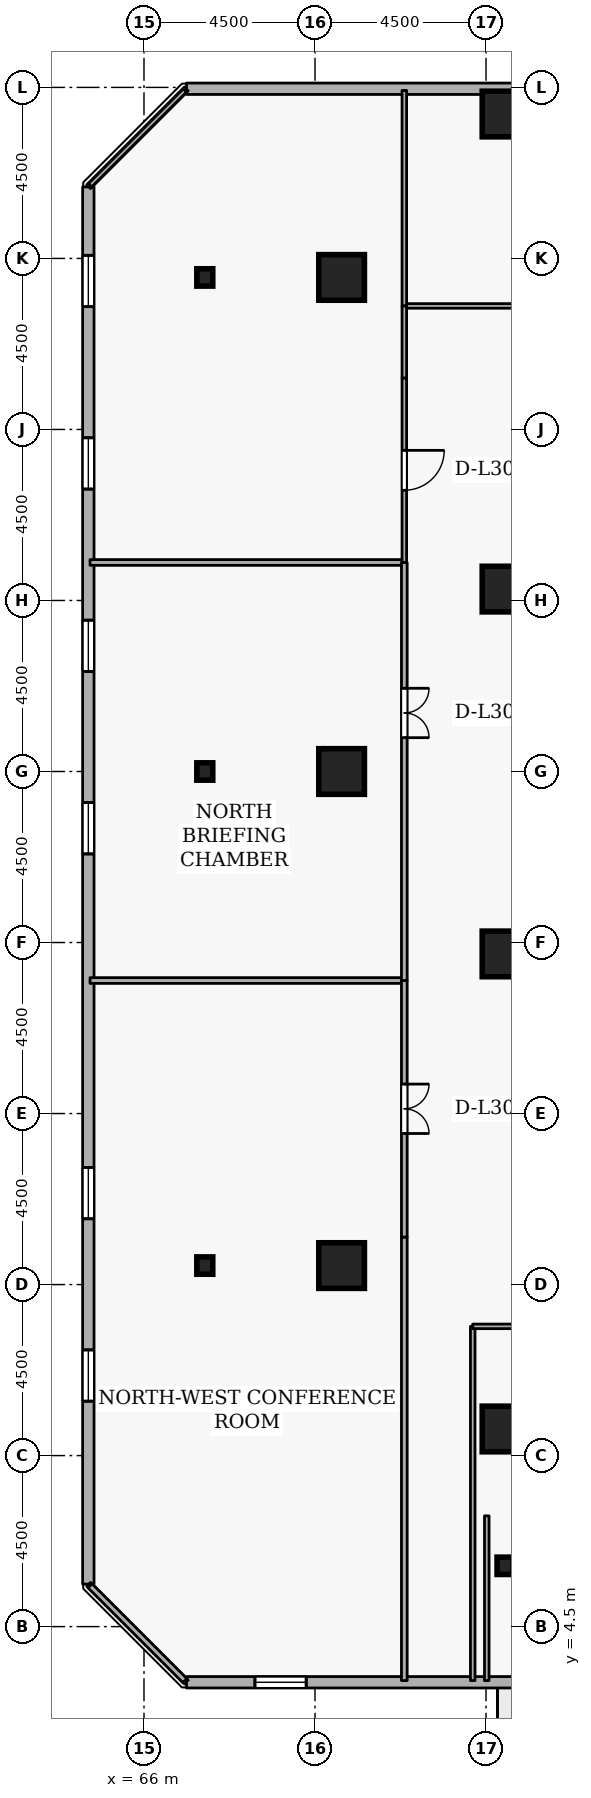
"""IFC4 building model, lengths in metres.
Left out: names, types, materials, properties, quantities, classifications, styles, units other than length and angle.
Written with IfcOpenShell. Run it as: python <this file> out.ifc"""

import sys

from ifc_helpers import new_model, si_unit, direction, frame, frame_2d, origin, origin_2d, place, context, subcontext, project, spatial, rectangle, i_section, extrude, element, fill, save


model = new_model("IFC4")
c1 = context("Model", 3, precision=1e-05, world=origin(), true_north=direction((0.0, 1.0)))
c2 = subcontext(c1, "Body", "Model", "MODEL_VIEW")
j1 = project(units=[si_unit("LENGTHUNIT", "METRE"), si_unit("PLANEANGLEUNIT", "RADIAN")], contexts=[c1])
p1 = place(None, origin())
s1 = spatial("IfcSite", under=j1, at=p1, CompositionType="ELEMENT")
p2 = place(p1, origin())
s2 = spatial("IfcBuilding", under=s1, at=p2, CompositionType="ELEMENT")
p3 = place(p2, frame((0.0, 0.0, 116.1)))
s3 = spatial("IfcBuildingStorey", under=s2, at=p3, CompositionType="ELEMENT", Elevation=116.1)
for number, where, z_axis, x_axis in (
    (1, (75.5, 44.3, 0.0), (0.0, 0.0, 1.0), (1.0, 0.0, 0.0)),
    (2, (71.2, 14.0, 0.0), (0.0, 0.0, 1.0), (1.0, 0.0, 0.0)),
    (3, (71.2, 27.0, 0.0), (0.0, 0.0, 1.0), (1.0, 0.0, 0.0)),
    (4, (71.2, 40.0, 0.0), (0.0, 0.0, 1.0), (1.0, 0.0, 0.0)),
    (5, (75.5, 9.7, 0.0), (0.0, 0.0, 1.0), (1.0, 0.0, 0.0)),
    (6, (75.5, 22.2, 0.0), (0.0, 0.0, 1.0), (1.0, 0.0, 0.0)),
    (7, (75.5, 31.8, 0.0), (0.0, 0.0, 1.0), (1.0, 0.0, 0.0)),
):
    element("IfcColumn", number, at=place(p3, frame(where, z_axis=z_axis, x_axis=x_axis)), inside=s3, PredefinedType="COLUMN", context=c2, shape_type="SweptSolid", body=[
        extrude(rectangle(XDim=1.2, YDim=1.2, at=origin_2d()), origin(), (0.0, 0.0, 1.0), 3.6),
    ])
for number, where, z_axis, x_axis in (
    (8, (67.6, 14.0, 0.0), (0.0, 0.0, 1.0), (1.0, 0.0, 0.0)),
    (9, (67.6, 27.0, 0.0), (0.0, 0.0, 1.0), (1.0, 0.0, 0.0)),
    (10, (67.6, 40.0, 0.0), (0.0, 0.0, 1.0), (1.0, 0.0, 0.0)),
    (11, (75.5, 6.1, 0.0), (0.0, 0.0, 1.0), (1.0, 0.0, 0.0)),
):
    element("IfcColumn", number, at=place(p3, frame(where, z_axis=z_axis, x_axis=x_axis)), inside=s3, PredefinedType="COLUMN", context=c2, shape_type="SweptSolid", body=[
        extrude(i_section(OverallWidth=0.418, OverallDepth=0.456, WebThickness=0.042, FlangeThickness=0.067, FilletRadius=0.015, at=origin_2d()), origin(), (0.0, 0.0, 1.0), 3.6),
    ])
p4 = place(p3, frame((67.119, 3.035, 0.0), z_axis=(0.0, 0.0, 1.0), x_axis=(1.0, 0.0, 0.0)))
e12 = element("IfcWall", 12, at=p4, inside=s3, PredefinedType="STANDARD", context=c2, shape_type="SweptSolid", body=[
    extrude(rectangle(XDim=36.763, YDim=0.3, at=frame_2d((18.381, 0.0))), origin(), (0.0, 0.0, 1.0), 2.22),
])
p5 = place(p4, frame((19.281, 0.0, 0.0)))
e13 = element("IfcOpeningElement", 13, at=p5, cuts=e12, PredefinedType="OPENING", context=c2, shape_type="SweptSolid", body=[
    extrude(rectangle(XDim=1.0, YDim=2.08, at=frame_2d((0.5, 1.04))), frame((0.0, 0.16, 0.0), z_axis=(0.0, -1.0, 0.0), x_axis=(1.0, 0.0, 0.0)), (0.0, 0.0, 1.0), 0.32),
])
p6 = place(p4, frame((1.8, 0.0, 0.72)))
e14 = element("IfcOpeningElement", 14, at=p6, cuts=e12, PredefinedType="OPENING", context=c2, shape_type="SweptSolid", body=[
    extrude(rectangle(XDim=1.35, YDim=1.05, at=frame_2d((0.675, 0.525))), frame((0.0, 0.16, 0.0), z_axis=(0.0, -1.0, 0.0), x_axis=(1.0, 0.0, 0.0)), (0.0, 0.0, 1.0), 0.32),
])
p7 = place(p4, frame((11.4, 0.0, 0.72)))
e15 = element("IfcOpeningElement", 15, at=p7, cuts=e12, PredefinedType="OPENING", context=c2, shape_type="SweptSolid", body=[
    extrude(rectangle(XDim=1.35, YDim=1.05, at=frame_2d((0.675, 0.525))), frame((0.0, 0.16, 0.0), z_axis=(0.0, -1.0, 0.0), x_axis=(1.0, 0.0, 0.0)), (0.0, 0.0, 1.0), 0.32),
])
p8 = place(p4, frame((16.2, 0.0, 0.72)))
e16 = element("IfcOpeningElement", 16, at=p8, cuts=e12, PredefinedType="OPENING", context=c2, shape_type="SweptSolid", body=[
    extrude(rectangle(XDim=1.35, YDim=1.05, at=frame_2d((0.675, 0.525))), frame((0.0, 0.16, 0.0), z_axis=(0.0, -1.0, 0.0), x_axis=(1.0, 0.0, 0.0)), (0.0, 0.0, 1.0), 0.32),
])
p9 = place(p4, frame((25.8, 0.0, 0.72)))
e17 = element("IfcOpeningElement", 17, at=p9, cuts=e12, PredefinedType="OPENING", context=c2, shape_type="SweptSolid", body=[
    extrude(rectangle(XDim=1.35, YDim=1.05, at=frame_2d((0.675, 0.525))), frame((0.0, 0.16, 0.0), z_axis=(0.0, -1.0, 0.0), x_axis=(1.0, 0.0, 0.0)), (0.0, 0.0, 1.0), 0.32),
])
p10 = place(p4, frame((30.6, 0.0, 0.72)))
e18 = element("IfcOpeningElement", 18, at=p10, cuts=e12, PredefinedType="OPENING", context=c2, shape_type="SweptSolid", body=[
    extrude(rectangle(XDim=1.35, YDim=1.05, at=frame_2d((0.675, 0.525))), frame((0.0, 0.16, 0.0), z_axis=(0.0, -1.0, 0.0), x_axis=(1.0, 0.0, 0.0)), (0.0, 0.0, 1.0), 0.32),
])
p11 = place(p3, frame((103.881, 44.965, 0.0), z_axis=(0.0, 0.0, 1.0), x_axis=(-1.0, 0.0, 0.0)))
e19 = element("IfcWall", 19, at=p11, inside=s3, PredefinedType="STANDARD", context=c2, shape_type="SweptSolid", body=[
    extrude(rectangle(XDim=36.763, YDim=0.3, at=frame_2d((18.381, 0.0))), origin(), (0.0, 0.0, 1.0), 2.22),
])
p12 = place(p11, frame((6.6, 0.0, 0.72)))
e20 = element("IfcOpeningElement", 20, at=p12, cuts=e19, PredefinedType="OPENING", context=c2, shape_type="SweptSolid", body=[
    extrude(rectangle(XDim=1.35, YDim=1.05, at=frame_2d((0.675, 0.525))), frame((0.0, 0.16, 0.0), z_axis=(0.0, -1.0, 0.0), x_axis=(1.0, 0.0, 0.0)), (0.0, 0.0, 1.0), 0.32),
])
p13 = place(p11, frame((11.4, 0.0, 0.72)))
e21 = element("IfcOpeningElement", 21, at=p13, cuts=e19, PredefinedType="OPENING", context=c2, shape_type="SweptSolid", body=[
    extrude(rectangle(XDim=1.35, YDim=1.05, at=frame_2d((0.675, 0.525))), frame((0.0, 0.16, 0.0), z_axis=(0.0, -1.0, 0.0), x_axis=(1.0, 0.0, 0.0)), (0.0, 0.0, 1.0), 0.32),
])
p14 = place(p11, frame((21.0, 0.0, 0.72)))
e22 = element("IfcOpeningElement", 22, at=p14, cuts=e19, PredefinedType="OPENING", context=c2, shape_type="SweptSolid", body=[
    extrude(rectangle(XDim=1.35, YDim=1.05, at=frame_2d((0.675, 0.525))), frame((0.0, 0.16, 0.0), z_axis=(0.0, -1.0, 0.0), x_axis=(1.0, 0.0, 0.0)), (0.0, 0.0, 1.0), 0.32),
])
p15 = place(p11, frame((25.8, 0.0, 0.72)))
e23 = element("IfcOpeningElement", 23, at=p15, cuts=e19, PredefinedType="OPENING", context=c2, shape_type="SweptSolid", body=[
    extrude(rectangle(XDim=1.35, YDim=1.05, at=frame_2d((0.675, 0.525))), frame((0.0, 0.16, 0.0), z_axis=(0.0, -1.0, 0.0), x_axis=(1.0, 0.0, 0.0)), (0.0, 0.0, 1.0), 0.32),
])
p16 = place(p3, frame((64.535, 42.381, 0.0), z_axis=(0.0, 0.0, 1.0), x_axis=(0.0, -1.0, 0.0)))
e24 = element("IfcWall", 24, at=p16, inside=s3, PredefinedType="STANDARD", context=c2, shape_type="SweptSolid", body=[
    extrude(rectangle(XDim=36.763, YDim=0.3, at=frame_2d((18.381, 0.0))), origin(), (0.0, 0.0, 1.0), 2.22),
])
p17 = place(p16, frame((1.8, 0.0, 0.72)))
e25 = element("IfcOpeningElement", 25, at=p17, cuts=e24, PredefinedType="OPENING", context=c2, shape_type="SweptSolid", body=[
    extrude(rectangle(XDim=1.35, YDim=1.05, at=frame_2d((0.675, 0.525))), frame((0.0, 0.16, 0.0), z_axis=(0.0, -1.0, 0.0), x_axis=(1.0, 0.0, 0.0)), (0.0, 0.0, 1.0), 0.32),
])
p18 = place(p16, frame((6.6, 0.0, 0.72)))
e26 = element("IfcOpeningElement", 26, at=p18, cuts=e24, PredefinedType="OPENING", context=c2, shape_type="SweptSolid", body=[
    extrude(rectangle(XDim=1.35, YDim=1.05, at=frame_2d((0.675, 0.525))), frame((0.0, 0.16, 0.0), z_axis=(0.0, -1.0, 0.0), x_axis=(1.0, 0.0, 0.0)), (0.0, 0.0, 1.0), 0.32),
])
p19 = place(p16, frame((11.4, 0.0, 0.72)))
e27 = element("IfcOpeningElement", 27, at=p19, cuts=e24, PredefinedType="OPENING", context=c2, shape_type="SweptSolid", body=[
    extrude(rectangle(XDim=1.35, YDim=1.05, at=frame_2d((0.675, 0.525))), frame((0.0, 0.16, 0.0), z_axis=(0.0, -1.0, 0.0), x_axis=(1.0, 0.0, 0.0)), (0.0, 0.0, 1.0), 0.32),
])
p20 = place(p16, frame((16.2, 0.0, 0.72)))
e28 = element("IfcOpeningElement", 28, at=p20, cuts=e24, PredefinedType="OPENING", context=c2, shape_type="SweptSolid", body=[
    extrude(rectangle(XDim=1.35, YDim=1.05, at=frame_2d((0.675, 0.525))), frame((0.0, 0.16, 0.0), z_axis=(0.0, -1.0, 0.0), x_axis=(1.0, 0.0, 0.0)), (0.0, 0.0, 1.0), 0.32),
])
p21 = place(p16, frame((25.8, 0.0, 0.72)))
e29 = element("IfcOpeningElement", 29, at=p21, cuts=e24, PredefinedType="OPENING", context=c2, shape_type="SweptSolid", body=[
    extrude(rectangle(XDim=1.35, YDim=1.05, at=frame_2d((0.675, 0.525))), frame((0.0, 0.16, 0.0), z_axis=(0.0, -1.0, 0.0), x_axis=(1.0, 0.0, 0.0)), (0.0, 0.0, 1.0), 0.32),
])
p22 = place(p16, frame((30.6, 0.0, 0.72)))
e30 = element("IfcOpeningElement", 30, at=p22, cuts=e24, PredefinedType="OPENING", context=c2, shape_type="SweptSolid", body=[
    extrude(rectangle(XDim=1.35, YDim=1.05, at=frame_2d((0.675, 0.525))), frame((0.0, 0.16, 0.0), z_axis=(0.0, -1.0, 0.0), x_axis=(1.0, 0.0, 0.0)), (0.0, 0.0, 1.0), 0.32),
])
p23 = place(p3, frame((75.02, 7.414, 0.0), z_axis=(0.0, 0.0, 1.0), x_axis=(0.0, -1.0, 0.0)))
e31 = element("IfcWall", 31, at=p23, inside=s3, PredefinedType="PARTITIONING", context=c2, shape_type="SweptSolid", body=[
    extrude(rectangle(XDim=4.334, YDim=0.12, at=frame_2d((2.167, 0.0))), origin(), (0.0, 0.0, 1.0), 1.685),
])
p24 = place(p3, frame((74.65, 3.08, 0.0), z_axis=(0.0, 0.0, 1.0), x_axis=(0.0, 1.0, 0.0)))
e32 = element("IfcWall", 32, at=p24, inside=s3, PredefinedType="PARTITIONING", context=c2, shape_type="SweptSolid", body=[
    extrude(rectangle(XDim=9.32, YDim=0.12, at=frame_2d((4.66, 0.0))), origin(), (0.0, 0.0, 1.0), 3.32),
])
p25 = place(p3, frame((74.65, 12.4, 0.0), z_axis=(0.0, 0.0, 1.0), x_axis=(1.0, 0.0, 0.0)))
e33 = element("IfcWall", 33, at=p25, inside=s3, PredefinedType="PARTITIONING", context=c2, shape_type="SweptSolid", body=[
    extrude(rectangle(XDim=4.802, YDim=0.12, at=frame_2d((2.401, 0.0))), origin(), (0.0, 0.0, 1.0), 3.32),
])
p26 = place(p3, frame((82.2, 39.25, 0.0), z_axis=(0.0, 0.0, 1.0), x_axis=(-1.0, 0.0, 0.0)))
e34 = element("IfcWall", 34, at=p26, inside=s3, PredefinedType="PARTITIONING", context=c2, shape_type="SweptSolid", body=[
    extrude(rectangle(XDim=9.35, YDim=0.12, at=frame_2d((4.675, 0.0))), origin(), (0.0, 0.0, 1.0), 3.32),
])
p27 = place(p26, frame((4.2, 0.0, 0.0)))
e35 = element("IfcOpeningElement", 35, at=p27, cuts=e34, PredefinedType="OPENING", context=c2, shape_type="SweptSolid", body=[
    extrude(rectangle(XDim=0.95, YDim=2.1, at=frame_2d((0.475, 1.05))), frame((0.0, 0.07, 0.0), z_axis=(0.0, -1.0, 0.0), x_axis=(1.0, 0.0, 0.0)), (0.0, 0.0, 1.0), 0.14),
])
p28 = place(p3, frame((72.85, 39.25, 0.0), z_axis=(0.0, 0.0, 1.0), x_axis=(0.0, 1.0, 0.0)))
e36 = element("IfcWall", 36, at=p28, inside=s3, PredefinedType="PARTITIONING", context=c2, shape_type="SweptSolid", body=[
    extrude(rectangle(XDim=5.67, YDim=0.12, at=frame_2d((2.835, 0.0))), origin(), (0.0, 0.0, 1.0), 3.32),
])
p29 = place(p3, frame((72.85, 14.75, 0.0), z_axis=(0.0, 0.0, 1.0), x_axis=(0.0, -1.0, 0.0)))
e37 = element("IfcWall", 37, at=p29, inside=s3, PredefinedType="PARTITIONING", context=c2, shape_type="SweptSolid", body=[
    extrude(rectangle(XDim=11.67, YDim=0.15, at=frame_2d((5.835, 0.0))), origin(), (0.0, 0.0, 1.0), 3.32),
])
p30 = place(p3, frame((67.075, 3.08, 0.0), z_axis=(0.0, 0.0, 1.0), x_axis=(-0.707106781187, 0.707106781187, 0.0)))
e38 = element("IfcWall", 38, at=p30, inside=s3, PredefinedType="PARTITIONING", context=c2, shape_type="SweptSolid", body=[
    extrude(rectangle(XDim=3.528, YDim=0.15, at=frame_2d((1.764, 0.0))), origin(), (0.0, 0.0, 1.0), 3.32),
])
p31 = place(p3, frame((64.58, 21.5, 0.0), z_axis=(0.0, 0.0, 1.0), x_axis=(1.0, 0.0, 0.0)))
e39 = element("IfcWall", 39, at=p31, inside=s3, PredefinedType="PARTITIONING", context=c2, shape_type="SweptSolid", body=[
    extrude(rectangle(XDim=8.27, YDim=0.15, at=frame_2d((4.135, 0.0))), origin(), (0.0, 0.0, 1.0), 3.32),
])
p32 = place(p3, frame((72.85, 21.5, 0.0), z_axis=(0.0, 0.0, 1.0), x_axis=(0.0, -1.0, 0.0)))
e40 = element("IfcWall", 40, at=p32, inside=s3, PredefinedType="PARTITIONING", context=c2, shape_type="SweptSolid", body=[
    extrude(rectangle(XDim=6.75, YDim=0.15, at=frame_2d((3.375, 0.0))), origin(), (0.0, 0.0, 1.0), 3.32),
])
p33 = place(p32, frame((2.725, 0.0, 0.0)))
e41 = element("IfcOpeningElement", 41, at=p33, cuts=e40, PredefinedType="OPENING", context=c2, shape_type="SweptSolid", body=[
    extrude(rectangle(XDim=1.3, YDim=2.12, at=frame_2d((0.65, 1.06))), frame((0.0, 0.085, 0.0), z_axis=(0.0, -1.0, 0.0), x_axis=(1.0, 0.0, 0.0)), (0.0, 0.0, 1.0), 0.17),
])
p34 = place(p3, frame((64.58, 32.5, 0.0), z_axis=(0.0, 0.0, 1.0), x_axis=(1.0, 0.0, 0.0)))
e42 = element("IfcWall", 42, at=p34, inside=s3, PredefinedType="PARTITIONING", context=c2, shape_type="SweptSolid", body=[
    extrude(rectangle(XDim=8.27, YDim=0.15, at=frame_2d((4.135, 0.0))), origin(), (0.0, 0.0, 1.0), 3.32),
])
p35 = place(p3, frame((72.85, 32.5, 0.0), z_axis=(0.0, 0.0, 1.0), x_axis=(0.0, -1.0, 0.0)))
e43 = element("IfcWall", 43, at=p35, inside=s3, PredefinedType="PARTITIONING", context=c2, shape_type="SweptSolid", body=[
    extrude(rectangle(XDim=11.0, YDim=0.15, at=frame_2d((5.5, 0.0))), origin(), (0.0, 0.0, 1.0), 3.32),
])
p36 = place(p35, frame((3.31, 0.0, 0.0)))
e44 = element("IfcOpeningElement", 44, at=p36, cuts=e43, PredefinedType="OPENING", context=c2, shape_type="SweptSolid", body=[
    extrude(rectangle(XDim=1.3, YDim=2.12, at=frame_2d((0.65, 1.06))), frame((0.0, 0.085, 0.0), z_axis=(0.0, -1.0, 0.0), x_axis=(1.0, 0.0, 0.0)), (0.0, 0.0, 1.0), 0.17),
])
p37 = place(p3, frame((64.58, 42.425, 0.0), z_axis=(0.0, 0.0, 1.0), x_axis=(0.707106781187, 0.707106781187, 0.0)))
e45 = element("IfcWall", 45, at=p37, inside=s3, PredefinedType="PARTITIONING", context=c2, shape_type="SweptSolid", body=[
    extrude(rectangle(XDim=3.528, YDim=0.12, at=frame_2d((1.764, 0.0))), origin(), (0.0, 0.0, 1.0), 3.32),
])
p38 = place(p3, frame((72.85, 39.25, 0.0), z_axis=(0.0, 0.0, 1.0), x_axis=(0.0, -1.0, 0.0)))
e46 = element("IfcWall", 46, at=p38, inside=s3, PredefinedType="PARTITIONING", context=c2, shape_type="SweptSolid", body=[
    extrude(rectangle(XDim=1.9, YDim=0.12, at=frame_2d((0.95, 0.0))), origin(), (0.0, 0.0, 1.0), 3.32),
])
p39 = place(p3, frame((72.85, 37.35, 0.0), z_axis=(0.0, 0.0, 1.0), x_axis=(0.0, -1.0, 0.0)))
e47 = element("IfcWall", 47, at=p39, inside=s3, PredefinedType="PARTITIONING", context=c2, shape_type="SweptSolid", body=[
    extrude(rectangle(XDim=4.85, YDim=0.12, at=frame_2d((2.425, 0.0))), origin(), (0.0, 0.0, 1.0), 2.875),
])
p40 = place(p39, frame((1.9, 0.0, 0.0)))
e48 = element("IfcOpeningElement", 48, at=p40, cuts=e47, PredefinedType="OPENING", context=c2, shape_type="SweptSolid", body=[
    extrude(rectangle(XDim=1.05, YDim=2.1, at=frame_2d((0.525, 1.05))), frame((0.0, 0.07, 0.0), z_axis=(0.0, -1.0, 0.0), x_axis=(1.0, 0.0, 0.0)), (0.0, 0.0, 1.0), 0.14),
])
p41 = place(p6, origin())
e49 = element("IfcWindow", 49, at=p41, inside=s3, PartitioningType="SINGLE_PANEL", PredefinedType="WINDOW", context=c2, shape_type="SweptSolid", body=[
    extrude(rectangle(XDim=1.35, YDim=1.05, at=frame_2d((0.675, 0.525))), frame((0.0, 0.03, 0.0), z_axis=(0.0, -1.0, 0.0), x_axis=(1.0, 0.0, 0.0)), (0.0, 0.0, 1.0), 0.06),
])
fill(e14, e49)
p42 = place(p17, origin())
e50 = element("IfcWindow", 50, at=p42, inside=s3, PartitioningType="SINGLE_PANEL", PredefinedType="WINDOW", context=c2, shape_type="SweptSolid", body=[
    extrude(rectangle(XDim=1.35, YDim=1.05, at=frame_2d((0.675, 0.525))), frame((0.0, 0.03, 0.0), z_axis=(0.0, -1.0, 0.0), x_axis=(1.0, 0.0, 0.0)), (0.0, 0.0, 1.0), 0.06),
])
fill(e25, e50)
p43 = place(p18, origin())
e51 = element("IfcWindow", 51, at=p43, inside=s3, PartitioningType="SINGLE_PANEL", PredefinedType="WINDOW", context=c2, shape_type="SweptSolid", body=[
    extrude(rectangle(XDim=1.35, YDim=1.05, at=frame_2d((0.675, 0.525))), frame((0.0, 0.03, 0.0), z_axis=(0.0, -1.0, 0.0), x_axis=(1.0, 0.0, 0.0)), (0.0, 0.0, 1.0), 0.06),
])
fill(e26, e51)
p44 = place(p19, origin())
e52 = element("IfcWindow", 52, at=p44, inside=s3, PartitioningType="SINGLE_PANEL", PredefinedType="WINDOW", context=c2, shape_type="SweptSolid", body=[
    extrude(rectangle(XDim=1.35, YDim=1.05, at=frame_2d((0.675, 0.525))), frame((0.0, 0.03, 0.0), z_axis=(0.0, -1.0, 0.0), x_axis=(1.0, 0.0, 0.0)), (0.0, 0.0, 1.0), 0.06),
])
fill(e27, e52)
p45 = place(p20, origin())
e53 = element("IfcWindow", 53, at=p45, inside=s3, PartitioningType="SINGLE_PANEL", PredefinedType="WINDOW", context=c2, shape_type="SweptSolid", body=[
    extrude(rectangle(XDim=1.35, YDim=1.05, at=frame_2d((0.675, 0.525))), frame((0.0, 0.03, 0.0), z_axis=(0.0, -1.0, 0.0), x_axis=(1.0, 0.0, 0.0)), (0.0, 0.0, 1.0), 0.06),
])
fill(e28, e53)
p46 = place(p21, origin())
e54 = element("IfcWindow", 54, at=p46, inside=s3, PartitioningType="SINGLE_PANEL", PredefinedType="WINDOW", context=c2, shape_type="SweptSolid", body=[
    extrude(rectangle(XDim=1.35, YDim=1.05, at=frame_2d((0.675, 0.525))), frame((0.0, 0.03, 0.0), z_axis=(0.0, -1.0, 0.0), x_axis=(1.0, 0.0, 0.0)), (0.0, 0.0, 1.0), 0.06),
])
fill(e29, e54)
p47 = place(p22, origin())
e55 = element("IfcWindow", 55, at=p47, inside=s3, PartitioningType="SINGLE_PANEL", PredefinedType="WINDOW", context=c2, shape_type="SweptSolid", body=[
    extrude(rectangle(XDim=1.35, YDim=1.05, at=frame_2d((0.675, 0.525))), frame((0.0, 0.03, 0.0), z_axis=(0.0, -1.0, 0.0), x_axis=(1.0, 0.0, 0.0)), (0.0, 0.0, 1.0), 0.06),
])
fill(e30, e55)
p48 = place(p33, origin())
e56 = element("IfcDoor", 56, at=p48, inside=s3, OperationType="DOUBLE_DOOR_SINGLE_SWING", PredefinedType="DOOR", context=c2, shape_type="SweptSolid", body=[
    extrude(rectangle(XDim=1.3, YDim=2.12, at=frame_2d((0.65, 1.06))), frame((0.0, 0.025, 0.0), z_axis=(0.0, -1.0, 0.0), x_axis=(1.0, 0.0, 0.0)), (0.0, 0.0, 1.0), 0.05),
])
fill(e41, e56)
p49 = place(p36, origin())
e57 = element("IfcDoor", 57, at=p49, inside=s3, OperationType="DOUBLE_DOOR_SINGLE_SWING", PredefinedType="DOOR", context=c2, shape_type="SweptSolid", body=[
    extrude(rectangle(XDim=1.3, YDim=2.12, at=frame_2d((0.65, 1.06))), frame((0.0, 0.025, 0.0), z_axis=(0.0, -1.0, 0.0), x_axis=(1.0, 0.0, 0.0)), (0.0, 0.0, 1.0), 0.05),
])
fill(e44, e57)
p50 = place(p40, origin())
e58 = element("IfcDoor", 58, at=p50, inside=s3, OperationType="SINGLE_SWING_LEFT", PredefinedType="DOOR", context=c2, shape_type="SweptSolid", body=[
    extrude(rectangle(XDim=1.05, YDim=2.1, at=frame_2d((0.525, 1.05))), frame((0.0, 0.025, 0.0), z_axis=(0.0, -1.0, 0.0), x_axis=(1.0, 0.0, 0.0)), (0.0, 0.0, 1.0), 0.05),
])
fill(e48, e58)
save(model, sys.argv[1])
